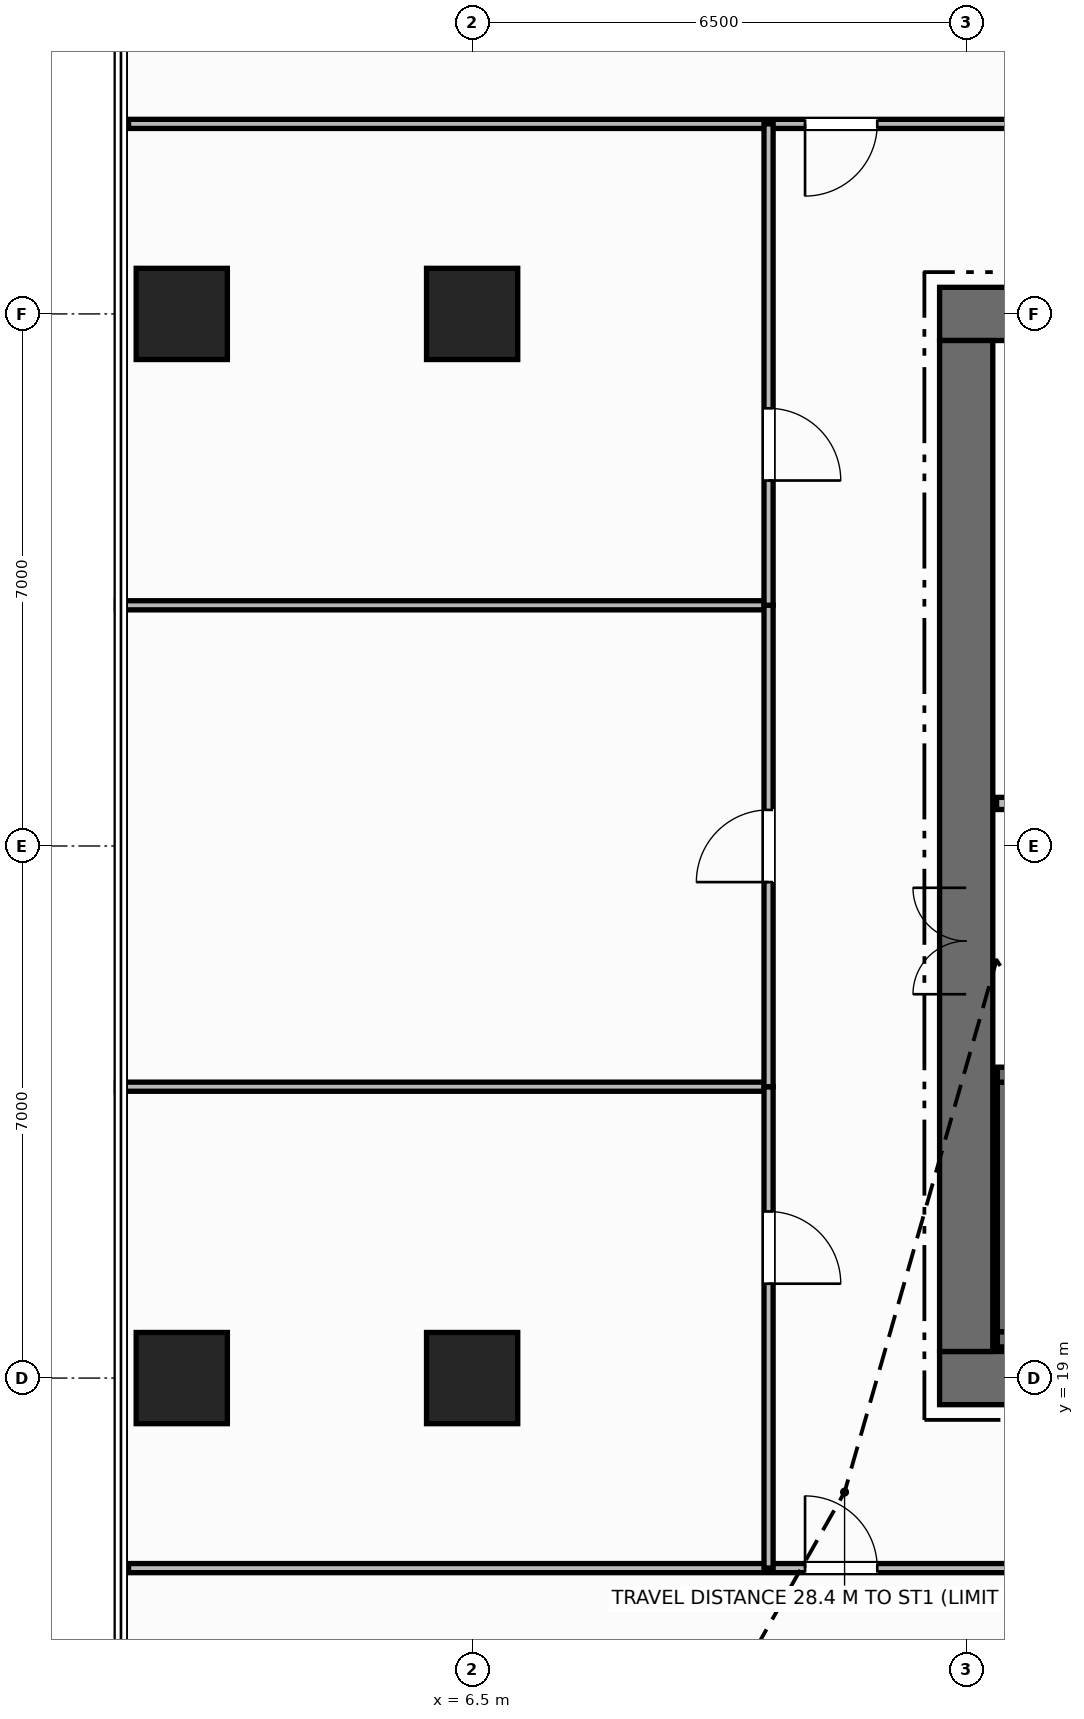
"""IFC4 building model, lengths in metres.
Left out: names, types, materials, properties, quantities, classifications, styles, units other than length and angle.
Written with IfcOpenShell. Run it as: python <this file> out.ifc"""

import sys

from ifc_helpers import new_model, si_unit, direction, frame, frame_2d, origin, origin_2d, place, context, subcontext, project, spatial, rectangle, extrude, element, fill, save


model = new_model("IFC4")
c1 = context("Model", 3, precision=1e-05, world=origin(), true_north=direction((0.0, 1.0)))
c2 = subcontext(c1, "Body", "Model", "MODEL_VIEW")
j1 = project(units=[si_unit("LENGTHUNIT", "METRE"), si_unit("PLANEANGLEUNIT", "RADIAN")], contexts=[c1])
p1 = place(None, origin())
s1 = spatial("IfcSite", under=j1, at=p1, CompositionType="ELEMENT")
p2 = place(p1, origin())
s2 = spatial("IfcBuilding", under=s1, at=p2, CompositionType="ELEMENT")
p3 = place(p2, frame((0.0, 0.0, 86.0)))
s3 = spatial("IfcBuildingStorey", under=s2, at=p3, CompositionType="ELEMENT", Elevation=86.0)
p4 = place(p3, frame((12.65, 19.0, 0.0), z_axis=(0.0, 0.0, 1.0), x_axis=(1.0, 0.0, 0.0)))
e1 = element("IfcWall", 1, at=p4, inside=s3, PredefinedType="SHEAR", context=c2, shape_type="SweptSolid", body=[
    extrude(rectangle(XDim=13.7, YDim=0.7, at=frame_2d((6.85, 0.0))), origin(), (0.0, 0.0, 1.0), 3.8),
])
p5 = place(p4, frame((9.23, 0.0, 0.0)))
e2 = element("IfcOpeningElement", 2, at=p5, cuts=e1, PredefinedType="OPENING", context=c2, shape_type="SweptSolid", body=[
    extrude(rectangle(XDim=1.4, YDim=2.2, at=frame_2d((0.7, 1.1))), frame((0.0, 0.36, 0.0), z_axis=(0.0, -1.0, 0.0), x_axis=(1.0, 0.0, 0.0)), (0.0, 0.0, 1.0), 0.72),
])
p6 = place(p3, frame((12.65, 33.0, 0.0), z_axis=(0.0, 0.0, 1.0), x_axis=(1.0, 0.0, 0.0)))
e3 = element("IfcWall", 3, at=p6, inside=s3, PredefinedType="SHEAR", context=c2, shape_type="SweptSolid", body=[
    extrude(rectangle(XDim=13.7, YDim=0.7, at=frame_2d((6.85, 0.0))), origin(), (0.0, 0.0, 1.0), 3.8),
])
p7 = place(p6, frame((1.25, 0.0, 0.0)))
e4 = element("IfcOpeningElement", 4, at=p7, cuts=e3, PredefinedType="OPENING", context=c2, shape_type="SweptSolid", body=[
    extrude(rectangle(XDim=0.9, YDim=2.15, at=frame_2d((0.45, 1.075))), frame((0.0, 0.36, 0.0), z_axis=(0.0, -1.0, 0.0), x_axis=(1.0, 0.0, 0.0)), (0.0, 0.0, 1.0), 0.72),
])
p8 = place(p6, frame((3.85, 0.0, 0.0)))
e5 = element("IfcOpeningElement", 5, at=p8, cuts=e3, PredefinedType="OPENING", context=c2, shape_type="SweptSolid", body=[
    extrude(rectangle(XDim=0.95, YDim=2.15, at=frame_2d((0.475, 1.075))), frame((0.0, 0.36, 0.0), z_axis=(0.0, -1.0, 0.0), x_axis=(1.0, 0.0, 0.0)), (0.0, 0.0, 1.0), 0.72),
])
p9 = place(p6, frame((6.85, 0.0, 0.0)))
e6 = element("IfcOpeningElement", 6, at=p9, cuts=e3, PredefinedType="OPENING", context=c2, shape_type="SweptSolid", body=[
    extrude(rectangle(XDim=0.95, YDim=2.15, at=frame_2d((0.475, 1.075))), frame((0.0, 0.36, 0.0), z_axis=(0.0, -1.0, 0.0), x_axis=(1.0, 0.0, 0.0)), (0.0, 0.0, 1.0), 0.72),
])
p10 = place(p6, frame((9.23, 0.0, 0.0)))
e7 = element("IfcOpeningElement", 7, at=p10, cuts=e3, PredefinedType="OPENING", context=c2, shape_type="SweptSolid", body=[
    extrude(rectangle(XDim=1.4, YDim=2.2, at=frame_2d((0.7, 1.1))), frame((0.0, 0.36, 0.0), z_axis=(0.0, -1.0, 0.0), x_axis=(1.0, 0.0, 0.0)), (0.0, 0.0, 1.0), 0.72),
])
p11 = place(p3, frame((13.0, 19.35, 0.0), z_axis=(0.0, 0.0, 1.0), x_axis=(0.0, 1.0, 0.0)))
e8 = element("IfcWall", 8, at=p11, inside=s3, PredefinedType="SHEAR", context=c2, shape_type="SweptSolid", body=[
    extrude(rectangle(XDim=13.3, YDim=0.7, at=frame_2d((6.65, 0.0))), origin(), (0.0, 0.0, 1.0), 3.8),
])
p12 = place(p11, frame((4.7, 0.0, 0.0)))
e9 = element("IfcOpeningElement", 9, at=p12, cuts=e8, PredefinedType="OPENING", context=c2, shape_type="SweptSolid", body=[
    extrude(rectangle(XDim=1.4, YDim=2.2, at=frame_2d((0.7, 1.1))), frame((0.0, 0.36, 0.0), z_axis=(0.0, -1.0, 0.0), x_axis=(1.0, 0.0, 0.0)), (0.0, 0.0, 1.0), 0.72),
])
p13 = place(p3, frame((13.41, 19.51, 0.0), z_axis=(0.0, 0.0, 1.0), x_axis=(1.0, 0.0, 0.0)))
e10 = element("IfcWall", 10, at=p13, inside=s3, PredefinedType="SHEAR", context=c2, shape_type="SweptSolid", body=[
    extrude(rectangle(XDim=8.43, YDim=0.2, at=frame_2d((4.215, 0.0))), origin(), (0.0, 0.0, 1.0), 3.8),
])
p14 = place(p3, frame((13.41, 22.99, 0.0), z_axis=(0.0, 0.0, 1.0), x_axis=(1.0, 0.0, 0.0)))
e11 = element("IfcWall", 11, at=p14, inside=s3, PredefinedType="SHEAR", context=c2, shape_type="SweptSolid", body=[
    extrude(rectangle(XDim=8.43, YDim=0.2, at=frame_2d((4.215, 0.0))), origin(), (0.0, 0.0, 1.0), 3.8),
])
p15 = place(p14, frame((0.45, 0.0, 0.0)))
e12 = element("IfcOpeningElement", 12, at=p15, cuts=e11, PredefinedType="OPENING", context=c2, shape_type="SweptSolid", body=[
    extrude(rectangle(XDim=1.0, YDim=2.15, at=frame_2d((0.5, 1.075))), frame((0.0, 0.11, 0.0), z_axis=(0.0, -1.0, 0.0), x_axis=(1.0, 0.0, 0.0)), (0.0, 0.0, 1.0), 0.22),
])
p16 = place(p3, frame((13.51, 19.61, 0.0), z_axis=(0.0, 0.0, 1.0), x_axis=(0.0, 1.0, 0.0)))
e13 = element("IfcWall", 13, at=p16, inside=s3, PredefinedType="SHEAR", context=c2, shape_type="SweptSolid", body=[
    extrude(rectangle(XDim=3.28, YDim=0.2, at=frame_2d((1.64, 0.0))), origin(), (0.0, 0.0, 1.0), 3.8),
])
for number, where, z_axis, x_axis in (
    (14, (6.5, 19.0, 0.0), (0.0, 0.0, 1.0), (1.0, 0.0, 0.0)),
    (15, (6.5, 33.0, 0.0), (0.0, 0.0, 1.0), (1.0, 0.0, 0.0)),
    (16, (2.68, 19.0, 0.0), (0.0, 0.0, 1.0), (1.0, 0.0, 0.0)),
    (17, (2.68, 33.0, 0.0), (0.0, 0.0, 1.0), (1.0, 0.0, 0.0)),
):
    element("IfcColumn", number, at=place(p3, frame(where, z_axis=z_axis, x_axis=x_axis)), inside=s3, PredefinedType="COLUMN", context=c2, shape_type="SweptSolid", body=[
        extrude(rectangle(XDim=1.2, YDim=1.2, at=origin_2d()), origin(), (0.0, 0.0, 1.0), 3.8),
    ])
p17 = place(p3, frame((13.4, 26.56, 0.0), z_axis=(0.0, 0.0, 1.0), x_axis=(1.0, 0.0, 0.0)))
e18 = element("IfcWall", 18, at=p17, inside=s3, PredefinedType="STANDARD", context=c2, shape_type="SweptSolid", body=[
    extrude(rectangle(XDim=8.34, YDim=0.16, at=frame_2d((4.17, 0.0))), origin(), (0.0, 0.0, 1.0), 3.565),
])
p18 = place(p3, frame((1.98, 35.5, 0.0), z_axis=(0.0, 0.0, 1.0), x_axis=(1.0, 0.0, 0.0)))
e19 = element("IfcWall", 19, at=p18, inside=s3, PredefinedType="PARTITIONING", context=c2, shape_type="SweptSolid", body=[
    extrude(rectangle(XDim=13.237, YDim=0.12, at=frame_2d((6.619, 0.0))), origin(), (0.0, 0.0, 1.0), 3.565),
])
p19 = place(p18, frame((8.9, 0.0, 0.0)))
e20 = element("IfcOpeningElement", 20, at=p19, cuts=e19, PredefinedType="OPENING", context=c2, shape_type="SweptSolid", body=[
    extrude(rectangle(XDim=0.95, YDim=2.15, at=frame_2d((0.475, 1.075))), frame((0.0, 0.07, 0.0), z_axis=(0.0, -1.0, 0.0), x_axis=(1.0, 0.0, 0.0)), (0.0, 0.0, 1.0), 0.14),
])
p20 = place(p3, frame((1.98, 16.5, 0.0), z_axis=(0.0, 0.0, 1.0), x_axis=(1.0, 0.0, 0.0)))
e21 = element("IfcWall", 21, at=p20, inside=s3, PredefinedType="PARTITIONING", context=c2, shape_type="SweptSolid", body=[
    extrude(rectangle(XDim=24.203, YDim=0.12, at=frame_2d((12.102, 0.0))), origin(), (0.0, 0.0, 1.0), 3.565),
])
p21 = place(p20, frame((8.9, 0.0, 0.0)))
e22 = element("IfcOpeningElement", 22, at=p21, cuts=e21, PredefinedType="OPENING", context=c2, shape_type="SweptSolid", body=[
    extrude(rectangle(XDim=0.95, YDim=2.15, at=frame_2d((0.475, 1.075))), frame((0.0, 0.07, 0.0), z_axis=(0.0, -1.0, 0.0), x_axis=(1.0, 0.0, 0.0)), (0.0, 0.0, 1.0), 0.14),
])
p22 = place(p3, frame((1.82, 22.833, 0.0), z_axis=(0.0, 0.0, 1.0), x_axis=(1.0, 0.0, 0.0)))
e23 = element("IfcWall", 23, at=p22, inside=s3, PredefinedType="PARTITIONING", context=c2, shape_type="SweptSolid", body=[
    extrude(rectangle(XDim=8.58, YDim=0.12, at=frame_2d((4.29, 0.0))), origin(), (0.0, 0.0, 1.0), 3.565),
])
p23 = place(p3, frame((10.4, 16.5, 0.0), z_axis=(0.0, 0.0, 1.0), x_axis=(0.0, 1.0, 0.0)))
e24 = element("IfcWall", 24, at=p23, inside=s3, PredefinedType="PARTITIONING", context=c2, shape_type="SweptSolid", body=[
    extrude(rectangle(XDim=6.333, YDim=0.12, at=frame_2d((3.167, 0.0))), origin(), (0.0, 0.0, 1.0), 3.565),
])
p24 = place(p23, frame((3.742, 0.0, 0.0)))
e25 = element("IfcOpeningElement", 25, at=p24, cuts=e24, PredefinedType="OPENING", context=c2, shape_type="SweptSolid", body=[
    extrude(rectangle(XDim=0.95, YDim=2.15, at=frame_2d((0.475, 1.075))), frame((0.0, 0.07, 0.0), z_axis=(0.0, -1.0, 0.0), x_axis=(1.0, 0.0, 0.0)), (0.0, 0.0, 1.0), 0.14),
])
p25 = place(p3, frame((1.82, 29.167, 0.0), z_axis=(0.0, 0.0, 1.0), x_axis=(1.0, 0.0, 0.0)))
e26 = element("IfcWall", 26, at=p25, inside=s3, PredefinedType="PARTITIONING", context=c2, shape_type="SweptSolid", body=[
    extrude(rectangle(XDim=8.58, YDim=0.12, at=frame_2d((4.29, 0.0))), origin(), (0.0, 0.0, 1.0), 3.565),
])
p26 = place(p3, frame((10.4, 22.833, 0.0), z_axis=(0.0, 0.0, 1.0), x_axis=(0.0, 1.0, 0.0)))
e27 = element("IfcWall", 27, at=p26, inside=s3, PredefinedType="PARTITIONING", context=c2, shape_type="SweptSolid", body=[
    extrude(rectangle(XDim=6.333, YDim=0.12, at=frame_2d((3.167, 0.0))), origin(), (0.0, 0.0, 1.0), 3.565),
])
p27 = place(p26, frame((2.692, 0.0, 0.0)))
e28 = element("IfcOpeningElement", 28, at=p27, cuts=e27, PredefinedType="OPENING", context=c2, shape_type="SweptSolid", body=[
    extrude(rectangle(XDim=0.95, YDim=2.15, at=frame_2d((0.475, 1.075))), frame((0.0, 0.07, 0.0), z_axis=(0.0, -1.0, 0.0), x_axis=(1.0, 0.0, 0.0)), (0.0, 0.0, 1.0), 0.14),
])
p28 = place(p3, frame((10.4, 29.167, 0.0), z_axis=(0.0, 0.0, 1.0), x_axis=(0.0, 1.0, 0.0)))
e29 = element("IfcWall", 29, at=p28, inside=s3, PredefinedType="PARTITIONING", context=c2, shape_type="SweptSolid", body=[
    extrude(rectangle(XDim=6.333, YDim=0.12, at=frame_2d((3.167, 0.0))), origin(), (0.0, 0.0, 1.0), 3.565),
])
p29 = place(p28, frame((1.642, 0.0, 0.0)))
e30 = element("IfcOpeningElement", 30, at=p29, cuts=e29, PredefinedType="OPENING", context=c2, shape_type="SweptSolid", body=[
    extrude(rectangle(XDim=0.95, YDim=2.15, at=frame_2d((0.475, 1.075))), frame((0.0, 0.07, 0.0), z_axis=(0.0, -1.0, 0.0), x_axis=(1.0, 0.0, 0.0)), (0.0, 0.0, 1.0), 0.14),
])
p30 = place(p12, origin())
e31 = element("IfcDoor", 31, at=p30, inside=s3, OperationType="DOUBLE_DOOR_SINGLE_SWING", PredefinedType="DOOR", context=c2, shape_type="SweptSolid", body=[
    extrude(rectangle(XDim=1.4, YDim=2.2, at=frame_2d((0.7, 1.1))), frame((0.0, 0.025, 0.0), z_axis=(0.0, -1.0, 0.0), x_axis=(1.0, 0.0, 0.0)), (0.0, 0.0, 1.0), 0.05),
])
fill(e9, e31)
p31 = place(p19, origin())
e32 = element("IfcDoor", 32, at=p31, inside=s3, OperationType="SINGLE_SWING_RIGHT", PredefinedType="DOOR", context=c2, shape_type="SweptSolid", body=[
    extrude(rectangle(XDim=0.95, YDim=2.15, at=frame_2d((0.475, 1.075))), frame((0.0, 0.025, 0.0), z_axis=(0.0, -1.0, 0.0), x_axis=(1.0, 0.0, 0.0)), (0.0, 0.0, 1.0), 0.05),
])
fill(e20, e32)
p32 = place(p21, origin())
e33 = element("IfcDoor", 33, at=p32, inside=s3, OperationType="SINGLE_SWING_LEFT", PredefinedType="DOOR", context=c2, shape_type="SweptSolid", body=[
    extrude(rectangle(XDim=0.95, YDim=2.15, at=frame_2d((0.475, 1.075))), frame((0.0, 0.025, 0.0), z_axis=(0.0, -1.0, 0.0), x_axis=(1.0, 0.0, 0.0)), (0.0, 0.0, 1.0), 0.05),
])
fill(e22, e33)
p33 = place(p24, origin())
e34 = element("IfcDoor", 34, at=p33, inside=s3, OperationType="SINGLE_SWING_RIGHT", PredefinedType="DOOR", context=c2, shape_type="SweptSolid", body=[
    extrude(rectangle(XDim=0.95, YDim=2.15, at=frame_2d((0.475, 1.075))), frame((0.0, 0.025, 0.0), z_axis=(0.0, -1.0, 0.0), x_axis=(1.0, 0.0, 0.0)), (0.0, 0.0, 1.0), 0.05),
])
fill(e25, e34)
p34 = place(p27, origin())
e35 = element("IfcDoor", 35, at=p34, inside=s3, OperationType="SINGLE_SWING_LEFT", PredefinedType="DOOR", context=c2, shape_type="SweptSolid", body=[
    extrude(rectangle(XDim=0.95, YDim=2.15, at=frame_2d((0.475, 1.075))), frame((0.0, 0.025, 0.0), z_axis=(0.0, -1.0, 0.0), x_axis=(1.0, 0.0, 0.0)), (0.0, 0.0, 1.0), 0.05),
])
fill(e28, e35)
p35 = place(p29, origin())
e36 = element("IfcDoor", 36, at=p35, inside=s3, OperationType="SINGLE_SWING_RIGHT", PredefinedType="DOOR", context=c2, shape_type="SweptSolid", body=[
    extrude(rectangle(XDim=0.95, YDim=2.15, at=frame_2d((0.475, 1.075))), frame((0.0, 0.025, 0.0), z_axis=(0.0, -1.0, 0.0), x_axis=(1.0, 0.0, 0.0)), (0.0, 0.0, 1.0), 0.05),
])
fill(e30, e36)
save(model, sys.argv[1])
